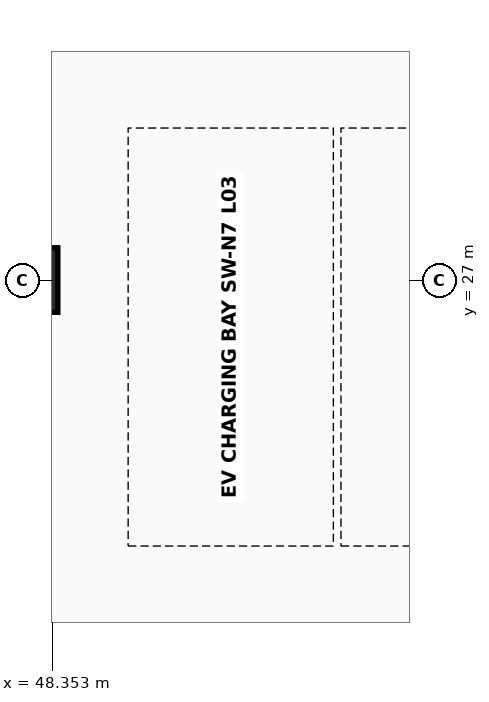
"""IFC4 building model, lengths in metres.
Left out: names, types, materials, properties, quantities, classifications, styles, units other than length and angle.
Written with IfcOpenShell. Run it as: python <this file> out.ifc"""

import sys

from ifc_helpers import new_model, si_unit, direction, frame, origin, origin_2d, place, context, subcontext, project, spatial, rectangle, extrude, element, save


model = new_model("IFC4")
c1 = context("Model", 3, precision=1e-05, world=origin(), true_north=direction((0.0, 1.0)))
c2 = subcontext(c1, "Body", "Model", "MODEL_VIEW")
j1 = project(units=[si_unit("LENGTHUNIT", "METRE"), si_unit("PLANEANGLEUNIT", "RADIAN")], contexts=[c1])
p1 = place(None, origin())
s1 = spatial("IfcSite", under=j1, at=p1, CompositionType="ELEMENT")
p2 = place(p1, origin())
s2 = spatial("IfcBuilding", under=s1, at=p2, CompositionType="ELEMENT")
p3 = place(p2, frame((0.0, 0.0, 13.4)))
s3 = spatial("IfcBuildingStorey", under=s2, at=p3, CompositionType="ELEMENT", Elevation=13.4)
p4 = place(p3, frame((48.0, 27.0, 0.0), z_axis=(0.0, 0.0, 1.0), x_axis=(1.0, 0.0, 0.0)))
e1 = element("IfcColumn", 1, at=p4, inside=s3, PredefinedType="COLUMN", context=c2, shape_type="SweptSolid", body=[
    extrude(rectangle(XDim=0.85, YDim=0.85, at=origin_2d()), origin(), (0.0, 0.0, 1.0), 3.8),
])
save(model, sys.argv[1])
